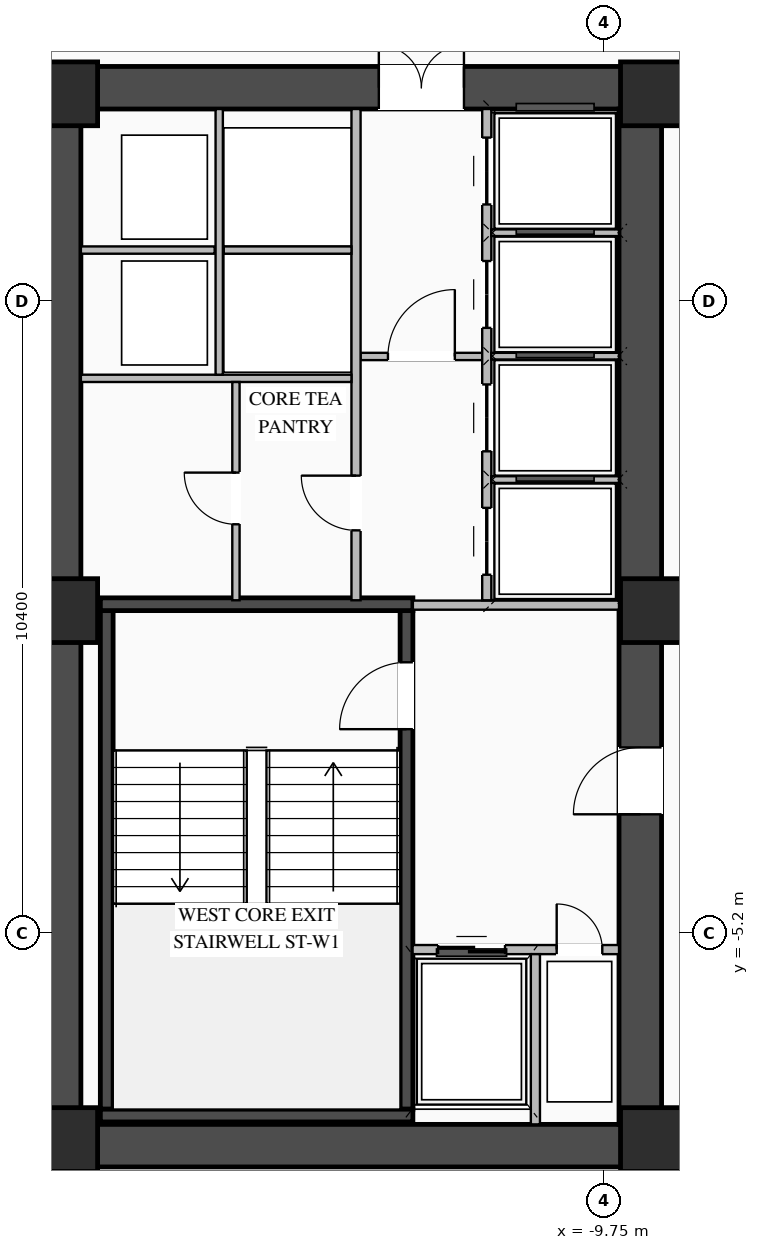
"""IFC4 building model, lengths in metres.
Left out: names, types, materials, properties, quantities, classifications, styles, units other than length and angle.
Written with IfcOpenShell. Run it as: python <this file> out.ifc"""

import sys

from ifc_helpers import new_model, si_unit, direction, frame, frame_2d, origin, origin_2d, place, context, subcontext, project, spatial, rectangle, extrude, element, fill, save


model = new_model("IFC4")
c1 = context("Model", 3, precision=1e-05, world=origin(), true_north=direction((0.0, 1.0)))
c2 = subcontext(c1, "Body", "Model", "MODEL_VIEW")
j1 = project(units=[si_unit("LENGTHUNIT", "METRE"), si_unit("PLANEANGLEUNIT", "RADIAN")], contexts=[c1])
p1 = place(None, origin())
s1 = spatial("IfcSite", under=j1, at=p1, CompositionType="ELEMENT")
p2 = place(p1, origin())
s2 = spatial("IfcBuilding", under=s1, at=p2, CompositionType="ELEMENT")
p3 = place(p2, frame((0.0, 0.0, 108.7)))
s3 = spatial("IfcBuildingStorey", under=s2, at=p3, CompositionType="ELEMENT", Elevation=108.7)
p4 = place(p3, frame((-19.05, -8.7, 0.0), z_axis=(0.0, 0.0, 1.0), x_axis=(1.0, 0.0, 0.0)))
e1 = element("IfcWall", 1, at=p4, inside=s3, PredefinedType="SHEAR", context=c2, shape_type="SweptSolid", body=[
    extrude(rectangle(XDim=10.25, YDim=0.7, at=frame_2d((5.125, 0.0))), origin(), (0.0, 0.0, 1.0), 3.17),
])
p5 = place(p3, frame((-19.05, 8.7, 0.0), z_axis=(0.0, 0.0, 1.0), x_axis=(1.0, 0.0, 0.0)))
e2 = element("IfcWall", 2, at=p5, inside=s3, PredefinedType="SHEAR", context=c2, shape_type="SweptSolid", body=[
    extrude(rectangle(XDim=10.25, YDim=0.7, at=frame_2d((5.125, 0.0))), origin(), (0.0, 0.0, 1.0), 3.17),
])
p6 = place(p5, frame((5.6, 0.0, 0.0)))
e3 = element("IfcOpeningElement", 3, at=p6, cuts=e2, PredefinedType="OPENING", context=c2, shape_type="SweptSolid", body=[
    extrude(rectangle(XDim=1.4, YDim=2.05, at=frame_2d((0.7, 1.025))), frame((0.0, 0.36, 0.0), z_axis=(0.0, -1.0, 0.0), x_axis=(1.0, 0.0, 0.0)), (0.0, 0.0, 1.0), 0.72),
])
p7 = place(p3, frame((-18.7, -8.35, 0.0), z_axis=(0.0, 0.0, 1.0), x_axis=(0.0, 1.0, 0.0)))
e4 = element("IfcWall", 4, at=p7, inside=s3, PredefinedType="SHEAR", context=c2, shape_type="SweptSolid", body=[
    extrude(rectangle(XDim=16.7, YDim=0.7, at=frame_2d((8.35, 0.0))), origin(), (0.0, 0.0, 1.0), 3.17),
])
p8 = place(p3, frame((-9.15, -8.35, 0.0), z_axis=(0.0, 0.0, 1.0), x_axis=(0.0, 1.0, 0.0)))
e5 = element("IfcWall", 5, at=p8, inside=s3, PredefinedType="SHEAR", context=c2, shape_type="SweptSolid", body=[
    extrude(rectangle(XDim=16.7, YDim=0.7, at=frame_2d((8.35, 0.0))), origin(), (0.0, 0.0, 1.0), 3.17),
])
p9 = place(p8, frame((5.1, 0.0, 0.0)))
e6 = element("IfcOpeningElement", 6, at=p9, cuts=e5, PredefinedType="OPENING", context=c2, shape_type="SweptSolid", body=[
    extrude(rectangle(XDim=1.1, YDim=2.08, at=frame_2d((0.55, 1.04))), frame((0.0, 0.36, 0.0), z_axis=(0.0, -1.0, 0.0), x_axis=(1.0, 0.0, 0.0)), (0.0, 0.0, 1.0), 0.72),
])
p10 = place(p3, frame((-12.995, -8.1, 0.0), z_axis=(0.0, 0.0, 1.0), x_axis=(0.0, 1.0, 0.0)))
e7 = element("IfcWall", 7, at=p10, inside=s3, PredefinedType="SHEAR", context=c2, shape_type="SweptSolid", body=[
    extrude(rectangle(XDim=8.2, YDim=0.21, at=frame_2d((4.1, 0.0))), origin(), (0.0, 0.0, 1.0), 3.17),
])
p11 = place(p10, frame((6.25, 0.0, 0.0)))
e8 = element("IfcOpeningElement", 8, at=p11, cuts=e7, PredefinedType="OPENING", context=c2, shape_type="SweptSolid", body=[
    extrude(rectangle(XDim=1.1, YDim=2.15, at=frame_2d((0.55, 1.075))), frame((0.0, 0.115, 0.0), z_axis=(0.0, -1.0, 0.0), x_axis=(1.0, 0.0, 0.0)), (0.0, 0.0, 1.0), 0.23),
])
p12 = place(p3, frame((-17.925, -8.1, 0.0), z_axis=(0.0, 0.0, 1.0), x_axis=(0.0, 1.0, 0.0)))
e9 = element("IfcWall", 9, at=p12, inside=s3, PredefinedType="SHEAR", context=c2, shape_type="SweptSolid", body=[
    extrude(rectangle(XDim=8.2, YDim=0.21, at=frame_2d((4.1, 0.0))), origin(), (0.0, 0.0, 1.0), 3.17),
])
for number, where, z_axis, x_axis in (
    (10, (-18.03, -8.205, 0.0), (0.0, 0.0, 1.0), (1.0, 0.0, 0.0)),
    (11, (-12.89, 0.205, 0.0), (0.0, 0.0, 1.0), (-1.0, 0.0, 0.0)),
):
    element("IfcWall", number, at=place(p3, frame(where, z_axis=z_axis, x_axis=x_axis)), inside=s3, PredefinedType="SHEAR", context=c2, shape_type="SweptSolid", body=[
        extrude(rectangle(XDim=5.14, YDim=0.21, at=frame_2d((2.57, 0.0))), origin(), (0.0, 0.0, 1.0), 3.17),
    ])
for number, where, z_axis, x_axis in (
    (12, (-8.95, -8.6, 0.0), (0.0, 0.0, 1.0), (1.0, 0.0, 0.0)),
    (13, (-8.95, 0.1, 0.0), (0.0, 0.0, 1.0), (1.0, 0.0, 0.0)),
    (14, (-8.95, 8.6, 0.0), (0.0, 0.0, 1.0), (1.0, 0.0, 0.0)),
    (15, (-18.6, -8.6, 0.0), (0.0, 0.0, 1.0), (1.0, 0.0, 0.0)),
    (16, (-18.6, 0.1, 0.0), (0.0, 0.0, 1.0), (1.0, 0.0, 0.0)),
    (17, (-18.6, 8.6, 0.0), (0.0, 0.0, 1.0), (1.0, 0.0, 0.0)),
):
    element("IfcColumn", number, at=place(p3, frame(where, z_axis=z_axis, x_axis=x_axis)), inside=s3, PredefinedType="COLUMN", context=c2, shape_type="SweptSolid", body=[
        extrude(rectangle(XDim=1.05, YDim=1.05, at=origin_2d()), origin(), (0.0, 0.0, 1.0), 3.45),
    ])
p13 = place(p3, frame((-12.895, -5.475, 0.0), z_axis=(0.0, 0.0, 1.0), x_axis=(1.0, 0.0, 0.0)))
e18 = element("IfcWall", 18, at=p13, inside=s3, PredefinedType="STANDARD", context=c2, shape_type="SweptSolid", body=[
    extrude(rectangle(XDim=3.395, YDim=0.15, at=frame_2d((1.698, 0.0))), origin(), (0.0, 0.0, 1.0), 3.15),
])
p14 = place(p13, frame((0.42, 0.0, 0.0)))
e19 = element("IfcOpeningElement", 19, at=p14, cuts=e18, PredefinedType="OPENING", context=c2, shape_type="SweptSolid", body=[
    extrude(rectangle(XDim=1.1, YDim=2.15, at=frame_2d((0.55, 1.075))), frame((0.0, 0.085, 0.0), z_axis=(0.0, -1.0, 0.0), x_axis=(1.0, 0.0, 0.0)), (0.0, 0.0, 1.0), 0.17),
])
p15 = place(p13, frame((2.37, 0.0, 0.0)))
e20 = element("IfcOpeningElement", 20, at=p15, cuts=e18, PredefinedType="OPENING", context=c2, shape_type="SweptSolid", body=[
    extrude(rectangle(XDim=0.75, YDim=2.05, at=frame_2d((0.375, 1.025))), frame((0.0, 0.085, 0.0), z_axis=(0.0, -1.0, 0.0), x_axis=(1.0, 0.0, 0.0)), (0.0, 0.0, 1.0), 0.17),
])
p16 = place(p3, frame((-10.875, -8.35, 0.0), z_axis=(0.0, 0.0, 1.0), x_axis=(0.0, 1.0, 0.0)))
e21 = element("IfcWall", 21, at=p16, inside=s3, PredefinedType="STANDARD", context=c2, shape_type="SweptSolid", body=[
    extrude(rectangle(XDim=2.8, YDim=0.15, at=frame_2d((1.4, 0.0))), origin(), (0.0, 0.0, 1.0), 3.15),
])
p17 = place(p3, frame((-12.89, 0.19, 0.0), z_axis=(0.0, 0.0, 1.0), x_axis=(1.0, 0.0, 0.0)))
e22 = element("IfcWall", 22, at=p17, inside=s3, PredefinedType="STANDARD", context=c2, shape_type="SweptSolid", body=[
    extrude(rectangle(XDim=3.39, YDim=0.15, at=frame_2d((1.695, 0.0))), origin(), (0.0, 0.0, 1.0), 2.545),
])
p18 = place(p3, frame((-13.75, 4.28, 0.0), z_axis=(0.0, 0.0, 1.0), x_axis=(1.0, 0.0, 0.0)))
e23 = element("IfcWall", 23, at=p18, inside=s3, PredefinedType="STANDARD", context=c2, shape_type="SweptSolid", body=[
    extrude(rectangle(XDim=2.0, YDim=0.12, at=frame_2d((1.0, 0.0))), origin(), (0.0, 0.0, 1.0), 3.15),
])
p19 = place(p18, frame((0.45, 0.0, 0.0)))
e24 = element("IfcOpeningElement", 24, at=p19, cuts=e23, PredefinedType="OPENING", context=c2, shape_type="SweptSolid", body=[
    extrude(rectangle(XDim=1.1, YDim=2.1, at=frame_2d((0.55, 1.05))), frame((0.0, 0.07, 0.0), z_axis=(0.0, -1.0, 0.0), x_axis=(1.0, 0.0, 0.0)), (0.0, 0.0, 1.0), 0.14),
])
p20 = place(p3, frame((-11.675, 0.27, 0.0), z_axis=(0.0, 0.0, 1.0), x_axis=(0.0, 1.0, 0.0)))
e25 = element("IfcWall", 25, at=p20, inside=s3, PredefinedType="STANDARD", context=c2, shape_type="SweptSolid", body=[
    extrude(rectangle(XDim=8.08, YDim=0.15, at=frame_2d((4.04, 0.0))), origin(), (0.0, 0.0, 1.0), 3.15),
])
p21 = place(p20, frame((0.42, 0.0, 0.0)))
e26 = element("IfcOpeningElement", 26, at=p21, cuts=e25, PredefinedType="OPENING", context=c2, shape_type="SweptSolid", body=[
    extrude(rectangle(XDim=1.1, YDim=2.1, at=frame_2d((0.55, 1.05))), frame((0.0, 0.085, 0.0), z_axis=(0.0, -1.0, 0.0), x_axis=(1.0, 0.0, 0.0)), (0.0, 0.0, 1.0), 0.17),
])
p22 = place(p20, frame((2.45, 0.0, 0.0)))
e27 = element("IfcOpeningElement", 27, at=p22, cuts=e25, PredefinedType="OPENING", context=c2, shape_type="SweptSolid", body=[
    extrude(rectangle(XDim=1.1, YDim=2.1, at=frame_2d((0.55, 1.05))), frame((0.0, 0.085, 0.0), z_axis=(0.0, -1.0, 0.0), x_axis=(1.0, 0.0, 0.0)), (0.0, 0.0, 1.0), 0.17),
])
p23 = place(p20, frame((4.48, 0.0, 0.0)))
e28 = element("IfcOpeningElement", 28, at=p23, cuts=e25, PredefinedType="OPENING", context=c2, shape_type="SweptSolid", body=[
    extrude(rectangle(XDim=1.1, YDim=2.1, at=frame_2d((0.55, 1.05))), frame((0.0, 0.085, 0.0), z_axis=(0.0, -1.0, 0.0), x_axis=(1.0, 0.0, 0.0)), (0.0, 0.0, 1.0), 0.17),
])
p24 = place(p20, frame((6.51, 0.0, 0.0)))
e29 = element("IfcOpeningElement", 29, at=p24, cuts=e25, PredefinedType="OPENING", context=c2, shape_type="SweptSolid", body=[
    extrude(rectangle(XDim=1.1, YDim=2.1, at=frame_2d((0.55, 1.05))), frame((0.0, 0.085, 0.0), z_axis=(0.0, -1.0, 0.0), x_axis=(1.0, 0.0, 0.0)), (0.0, 0.0, 1.0), 0.17),
])
for number, where, z_axis, x_axis in (
    (30, (-11.6, 2.255, 0.0), (0.0, 0.0, 1.0), (1.0, 0.0, 0.0)),
    (31, (-11.6, 4.285, 0.0), (0.0, 0.0, 1.0), (1.0, 0.0, 0.0)),
    (32, (-11.6, 6.315, 0.0), (0.0, 0.0, 1.0), (1.0, 0.0, 0.0)),
):
    element("IfcWall", number, at=place(p3, frame(where, z_axis=z_axis, x_axis=x_axis)), inside=s3, PredefinedType="STANDARD", context=c2, shape_type="SweptSolid", body=[
        extrude(rectangle(XDim=2.1, YDim=0.11, at=frame_2d((1.05, 0.0))), origin(), (0.0, 0.0, 1.0), 3.15),
    ])
p25 = place(p3, frame((-13.825, 0.27, 0.0), z_axis=(0.0, 0.0, 1.0), x_axis=(0.0, 1.0, 0.0)))
e33 = element("IfcWall", 33, at=p25, inside=s3, PredefinedType="STANDARD", context=c2, shape_type="SweptSolid", body=[
    extrude(rectangle(XDim=8.08, YDim=0.15, at=frame_2d((4.04, 0.0))), origin(), (0.0, 0.0, 1.0), 3.15),
])
p26 = place(p25, frame((1.15, 0.0, 0.0)))
e34 = element("IfcOpeningElement", 34, at=p26, cuts=e33, PredefinedType="OPENING", context=c2, shape_type="SweptSolid", body=[
    extrude(rectangle(XDim=0.9, YDim=2.05, at=frame_2d((0.45, 1.025))), frame((0.0, 0.085, 0.0), z_axis=(0.0, -1.0, 0.0), x_axis=(1.0, 0.0, 0.0)), (0.0, 0.0, 1.0), 0.17),
])
p27 = place(p3, frame((-18.35, 3.92, 0.0), z_axis=(0.0, 0.0, 1.0), x_axis=(1.0, 0.0, 0.0)))
e35 = element("IfcWall", 35, at=p27, inside=s3, PredefinedType="STANDARD", context=c2, shape_type="SweptSolid", body=[
    extrude(rectangle(XDim=4.45, YDim=0.12, at=frame_2d((2.225, 0.0))), origin(), (0.0, 0.0, 1.0), 3.15),
])
p28 = place(p3, frame((-18.35, 6.03, 0.0), z_axis=(0.0, 0.0, 1.0), x_axis=(1.0, 0.0, 0.0)))
e36 = element("IfcWall", 36, at=p28, inside=s3, PredefinedType="STANDARD", context=c2, shape_type="SweptSolid", body=[
    extrude(rectangle(XDim=2.2, YDim=0.12, at=frame_2d((1.1, 0.0))), origin(), (0.0, 0.0, 1.0), 3.15),
])
p29 = place(p3, frame((-16.075, 3.98, 0.0), z_axis=(0.0, 0.0, 1.0), x_axis=(0.0, 1.0, 0.0)))
e37 = element("IfcWall", 37, at=p29, inside=s3, PredefinedType="STANDARD", context=c2, shape_type="SweptSolid", body=[
    extrude(rectangle(XDim=4.37, YDim=0.12, at=frame_2d((2.185, 0.0))), origin(), (0.0, 0.0, 1.0), 3.15),
])
p30 = place(p3, frame((-16.0, 6.03, 0.0), z_axis=(0.0, 0.0, 1.0), x_axis=(1.0, 0.0, 0.0)))
e38 = element("IfcWall", 38, at=p30, inside=s3, PredefinedType="STANDARD", context=c2, shape_type="SweptSolid", body=[
    extrude(rectangle(XDim=2.1, YDim=0.12, at=frame_2d((1.05, 0.0))), origin(), (0.0, 0.0, 1.0), 3.15),
])
p31 = place(p3, frame((-15.8, 0.27, 0.0), z_axis=(0.0, 0.0, 1.0), x_axis=(0.0, 1.0, 0.0)))
e39 = element("IfcWall", 39, at=p31, inside=s3, PredefinedType="STANDARD", context=c2, shape_type="SweptSolid", body=[
    extrude(rectangle(XDim=3.59, YDim=0.12, at=frame_2d((1.795, 0.0))), origin(), (0.0, 0.0, 1.0), 3.15),
])
p32 = place(p31, frame((1.25, 0.0, 0.0)))
e40 = element("IfcOpeningElement", 40, at=p32, cuts=e39, PredefinedType="OPENING", context=c2, shape_type="SweptSolid", body=[
    extrude(rectangle(XDim=0.85, YDim=2.05, at=frame_2d((0.425, 1.025))), frame((0.0, 0.07, 0.0), z_axis=(0.0, -1.0, 0.0), x_axis=(1.0, 0.0, 0.0)), (0.0, 0.0, 1.0), 0.14),
])
p33 = place(p11, origin())
e41 = element("IfcDoor", 41, at=p33, inside=s3, OperationType="SINGLE_SWING_LEFT", PredefinedType="DOOR", context=c2, shape_type="SweptSolid", body=[
    extrude(rectangle(XDim=1.1, YDim=2.15, at=frame_2d((0.55, 1.075))), frame((0.0, 0.025, 0.0), z_axis=(0.0, -1.0, 0.0), x_axis=(1.0, 0.0, 0.0)), (0.0, 0.0, 1.0), 0.05),
])
fill(e8, e41)
p34 = place(p14, origin())
e42 = element("IfcDoor", 42, at=p34, inside=s3, OperationType="DOUBLE_DOOR_SLIDING", PredefinedType="DOOR", context=c2, shape_type="SweptSolid", body=[
    extrude(rectangle(XDim=1.1, YDim=2.15, at=frame_2d((0.55, 1.075))), frame((0.0, 0.025, 0.0), z_axis=(0.0, -1.0, 0.0), x_axis=(1.0, 0.0, 0.0)), (0.0, 0.0, 1.0), 0.05),
])
fill(e19, e42)
p35 = place(p15, origin())
e43 = element("IfcDoor", 43, at=p35, inside=s3, OperationType="SINGLE_SWING_LEFT", PredefinedType="DOOR", context=c2, shape_type="SweptSolid", body=[
    extrude(rectangle(XDim=0.75, YDim=2.05, at=frame_2d((0.375, 1.025))), frame((0.0, 0.025, 0.0), z_axis=(0.0, -1.0, 0.0), x_axis=(1.0, 0.0, 0.0)), (0.0, 0.0, 1.0), 0.05),
])
fill(e20, e43)
p36 = place(p9, origin())
e44 = element("IfcDoor", 44, at=p36, inside=s3, OperationType="SINGLE_SWING_LEFT", PredefinedType="DOOR", context=c2, shape_type="SweptSolid", body=[
    extrude(rectangle(XDim=1.1, YDim=2.08, at=frame_2d((0.55, 1.04))), frame((0.0, 0.305, 0.0), z_axis=(0.0, -1.0, 0.0), x_axis=(1.0, 0.0, 0.0)), (0.0, 0.0, 1.0), 0.05),
])
fill(e6, e44)
p37 = place(p19, origin())
e45 = element("IfcDoor", 45, at=p37, inside=s3, OperationType="SINGLE_SWING_RIGHT", PredefinedType="DOOR", context=c2, shape_type="SweptSolid", body=[
    extrude(rectangle(XDim=1.1, YDim=2.1, at=frame_2d((0.55, 1.05))), frame((0.0, 0.025, 0.0), z_axis=(0.0, -1.0, 0.0), x_axis=(1.0, 0.0, 0.0)), (0.0, 0.0, 1.0), 0.05),
])
fill(e24, e45)
p38 = place(p6, origin())
e46 = element("IfcDoor", 46, at=p38, inside=s3, OperationType="DOUBLE_DOOR_SINGLE_SWING", PredefinedType="DOOR", context=c2, shape_type="SweptSolid", body=[
    extrude(rectangle(XDim=1.4, YDim=2.05, at=frame_2d((0.7, 1.025))), frame((0.0, 0.295, 0.0), z_axis=(0.0, -1.0, 0.0), x_axis=(1.0, 0.0, 0.0)), (0.0, 0.0, 1.0), 0.05),
])
fill(e3, e46)
p39 = place(p21, origin())
e47 = element("IfcDoor", 47, at=p39, inside=s3, OperationType="DOUBLE_DOOR_SLIDING", PredefinedType="DOOR", context=c2, shape_type="SweptSolid", body=[
    extrude(rectangle(XDim=1.1, YDim=2.1, at=frame_2d((0.55, 1.05))), frame((0.0, 0.025, 0.0), z_axis=(0.0, -1.0, 0.0), x_axis=(1.0, 0.0, 0.0)), (0.0, 0.0, 1.0), 0.05),
])
fill(e26, e47)
p40 = place(p22, origin())
e48 = element("IfcDoor", 48, at=p40, inside=s3, OperationType="DOUBLE_DOOR_SLIDING", PredefinedType="DOOR", context=c2, shape_type="SweptSolid", body=[
    extrude(rectangle(XDim=1.1, YDim=2.1, at=frame_2d((0.55, 1.05))), frame((0.0, 0.025, 0.0), z_axis=(0.0, -1.0, 0.0), x_axis=(1.0, 0.0, 0.0)), (0.0, 0.0, 1.0), 0.05),
])
fill(e27, e48)
p41 = place(p23, origin())
e49 = element("IfcDoor", 49, at=p41, inside=s3, OperationType="DOUBLE_DOOR_SLIDING", PredefinedType="DOOR", context=c2, shape_type="SweptSolid", body=[
    extrude(rectangle(XDim=1.1, YDim=2.1, at=frame_2d((0.55, 1.05))), frame((0.0, 0.025, 0.0), z_axis=(0.0, -1.0, 0.0), x_axis=(1.0, 0.0, 0.0)), (0.0, 0.0, 1.0), 0.05),
])
fill(e28, e49)
p42 = place(p24, origin())
e50 = element("IfcDoor", 50, at=p42, inside=s3, OperationType="DOUBLE_DOOR_SLIDING", PredefinedType="DOOR", context=c2, shape_type="SweptSolid", body=[
    extrude(rectangle(XDim=1.1, YDim=2.1, at=frame_2d((0.55, 1.05))), frame((0.0, 0.025, 0.0), z_axis=(0.0, -1.0, 0.0), x_axis=(1.0, 0.0, 0.0)), (0.0, 0.0, 1.0), 0.05),
])
fill(e29, e50)
p43 = place(p26, origin())
e51 = element("IfcDoor", 51, at=p43, inside=s3, OperationType="SINGLE_SWING_RIGHT", PredefinedType="DOOR", context=c2, shape_type="SweptSolid", body=[
    extrude(rectangle(XDim=0.9, YDim=2.05, at=frame_2d((0.45, 1.025))), frame((0.0, 0.025, 0.0), z_axis=(0.0, -1.0, 0.0), x_axis=(1.0, 0.0, 0.0)), (0.0, 0.0, 1.0), 0.05),
])
fill(e34, e51)
p44 = place(p32, origin())
e52 = element("IfcDoor", 52, at=p44, inside=s3, OperationType="SINGLE_SWING_RIGHT", PredefinedType="DOOR", context=c2, shape_type="SweptSolid", body=[
    extrude(rectangle(XDim=0.85, YDim=2.05, at=frame_2d((0.425, 1.025))), frame((0.0, 0.025, 0.0), z_axis=(0.0, -1.0, 0.0), x_axis=(1.0, 0.0, 0.0)), (0.0, 0.0, 1.0), 0.05),
])
fill(e40, e52)
save(model, sys.argv[1])
